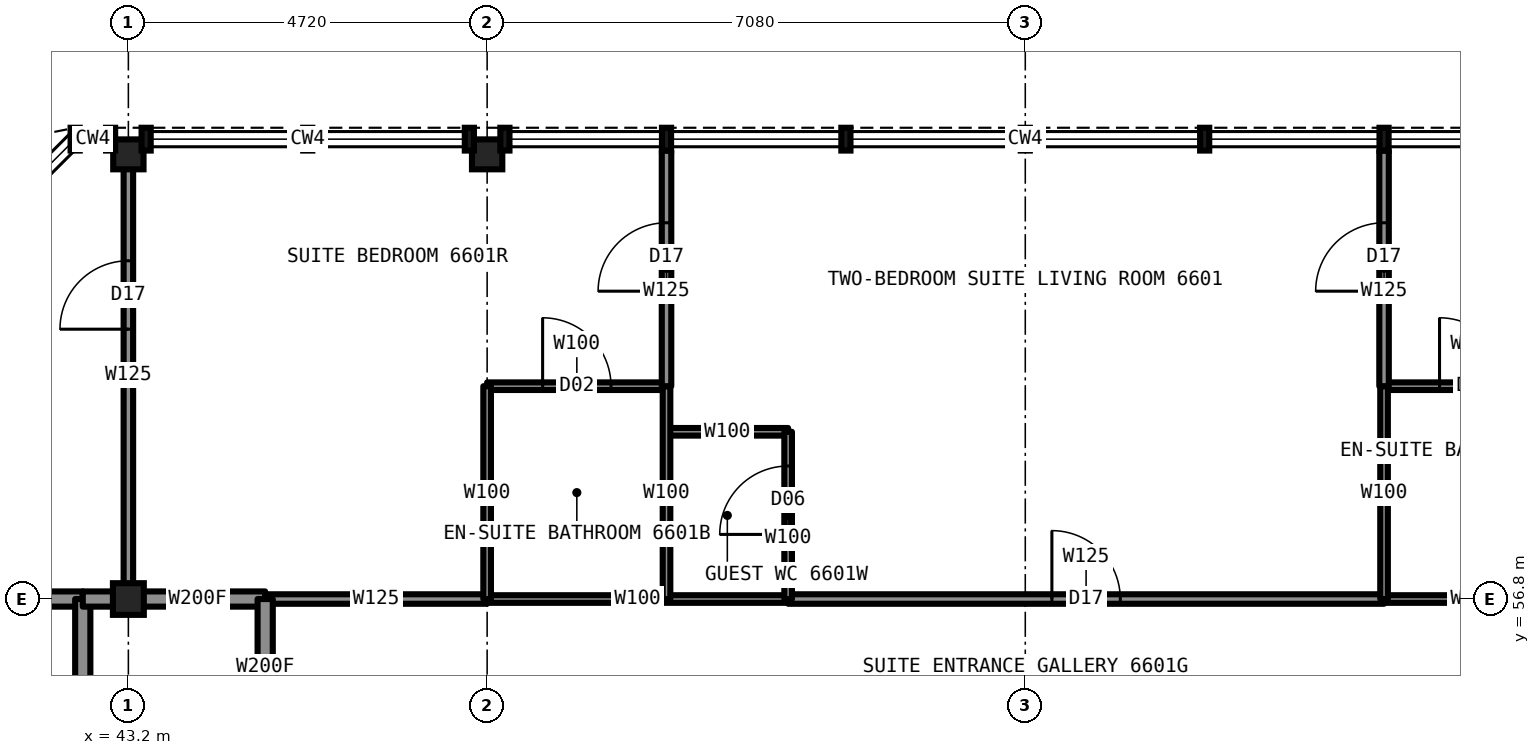
"""IFC4 building model, lengths in metres.
Left out: names, types, materials, properties, quantities, classifications, styles, units other than length and angle.
Written with IfcOpenShell. Run it as: python <this file> out.ifc"""

import sys

from ifc_helpers import new_model, si_unit, direction, frame, frame_2d, origin, origin_2d, place, context, subcontext, project, spatial, rectangle, i_section, extrude, element, fill, save


model = new_model("IFC4")
c1 = context("Model", 3, precision=1e-05, world=origin(), true_north=direction((0.0, 1.0)))
c2 = subcontext(c1, "Body", "Model", "MODEL_VIEW")
j1 = project(units=[si_unit("LENGTHUNIT", "METRE"), si_unit("PLANEANGLEUNIT", "RADIAN")], contexts=[c1])
p1 = place(None, origin())
s1 = spatial("IfcSite", under=j1, at=p1, CompositionType="ELEMENT")
p2 = place(p1, origin())
s2 = spatial("IfcBuilding", under=s1, at=p2, CompositionType="ELEMENT")
p3 = place(p2, frame((0.0, 0.0, 237.2)))
s3 = spatial("IfcBuildingStorey", under=s2, at=p3, CompositionType="ELEMENT", Elevation=237.2)
for number, where, z_axis, x_axis in (
    (1, (43.2, 62.65, 0.0), (0.0, 0.0, 1.0), (1.0, 0.0, 0.0)),
    (2, (47.92, 62.65, 0.0), (0.0, 0.0, 1.0), (1.0, 0.0, 0.0)),
):
    element("IfcColumn", number, at=place(p3, frame(where, z_axis=z_axis, x_axis=x_axis)), inside=s3, PredefinedType="COLUMN", context=c2, shape_type="SweptSolid", body=[
        extrude(i_section(OverallWidth=0.399, OverallDepth=0.394, WebThickness=0.023, FlangeThickness=0.037, at=origin_2d()), origin(), (0.0, 0.0, 1.0), 3.5),
    ])
p4 = place(p3, frame((43.2, 56.8, 0.0), z_axis=(0.0, 0.0, 1.0), x_axis=(1.0, 0.0, 0.0)))
e3 = element("IfcColumn", 3, at=p4, inside=s3, PredefinedType="COLUMN", context=c2, shape_type="SweptSolid", body=[
    extrude(i_section(OverallWidth=0.406, OverallDepth=0.417, WebThickness=0.03, FlangeThickness=0.048, at=origin_2d()), origin(), (0.0, 0.0, 1.0), 3.5),
])
p5 = place(p3, frame((47.92, 56.8, 0.0), z_axis=(0.0, 0.0, 1.0), x_axis=(1.0, 0.0, 0.0)))
e4 = element("IfcWall", 4, at=p5, inside=s3, PredefinedType="PARTITIONING", context=c2, shape_type="SweptSolid", body=[
    extrude(rectangle(XDim=3.96, YDim=0.1, at=frame_2d((1.98, 0.0))), origin(), (0.0, 0.0, 1.0), 3.33),
])
p6 = place(p3, frame((59.72, 56.8, 0.0), z_axis=(0.0, 0.0, 1.0), x_axis=(1.0, 0.0, 0.0)))
e5 = element("IfcWall", 5, at=p6, inside=s3, PredefinedType="PARTITIONING", context=c2, shape_type="SweptSolid", body=[
    extrude(rectangle(XDim=2.36, YDim=0.1, at=frame_2d((1.18, 0.0))), origin(), (0.0, 0.0, 1.0), 3.33),
])
p7 = place(p3, frame((43.22, 56.8, 0.0), z_axis=(0.0, 0.0, 1.0), x_axis=(1.0, 0.0, 0.0)))
e6 = element("IfcWall", 6, at=p7, inside=s3, PredefinedType="PARTITIONING", context=c2, shape_type="SweptSolid", body=[
    extrude(rectangle(XDim=1.78, YDim=0.2, at=frame_2d((0.89, 0.0))), origin(), (0.0, 0.0, 1.0), 3.33),
])
p8 = place(p3, frame((37.3, 56.8, 0.0), z_axis=(0.0, 0.0, 1.0), x_axis=(1.0, 0.0, 0.0)))
e7 = element("IfcWall", 7, at=p8, inside=s3, PredefinedType="PARTITIONING", context=c2, shape_type="SweptSolid", body=[
    extrude(rectangle(XDim=5.3, YDim=0.2, at=frame_2d((2.65, 0.0))), origin(), (0.0, 0.0, 1.0), 2.573),
])
p9 = place(p3, frame((45.0, 56.8, 0.0), z_axis=(0.0, 0.0, 1.0), x_axis=(1.0, 0.0, 0.0)))
e8 = element("IfcWall", 8, at=p9, inside=s3, PredefinedType="PARTITIONING", context=c2, shape_type="SweptSolid", body=[
    extrude(rectangle(XDim=2.92, YDim=0.125, at=frame_2d((1.46, 0.0))), origin(), (0.0, 0.0, 1.0), 3.33),
])
p10 = place(p3, frame((51.88, 56.8, 0.0), z_axis=(0.0, 0.0, 1.0), x_axis=(1.0, 0.0, 0.0)))
e9 = element("IfcWall", 9, at=p10, inside=s3, PredefinedType="PARTITIONING", context=c2, shape_type="SweptSolid", body=[
    extrude(rectangle(XDim=7.84, YDim=0.125, at=frame_2d((3.92, 0.0))), origin(), (0.0, 0.0, 1.0), 3.33),
])
p11 = place(p10, frame((3.47, 0.0, 0.0)))
e10 = element("IfcOpeningElement", 10, at=p11, cuts=e9, PredefinedType="OPENING", context=c2, shape_type="SweptSolid", body=[
    extrude(rectangle(XDim=0.9, YDim=2.2, at=frame_2d((0.45, 1.1))), frame((0.0, 0.073, 0.0), z_axis=(0.0, -1.0, 0.0), x_axis=(1.0, 0.0, 0.0)), (0.0, 0.0, 1.0), 0.145),
])
p12 = place(p3, frame((50.28, 59.0, 0.0), z_axis=(0.0, 0.0, 1.0), x_axis=(1.0, 0.0, 0.0)))
e11 = element("IfcWall", 11, at=p12, inside=s3, PredefinedType="PARTITIONING", context=c2, shape_type="SweptSolid", body=[
    extrude(rectangle(XDim=1.6, YDim=0.1, at=frame_2d((0.8, 0.0))), origin(), (0.0, 0.0, 1.0), 3.33),
])
p13 = place(p3, frame((47.92, 59.6, 0.0), z_axis=(0.0, 0.0, 1.0), x_axis=(1.0, 0.0, 0.0)))
e12 = element("IfcWall", 12, at=p13, inside=s3, PredefinedType="PARTITIONING", context=c2, shape_type="SweptSolid", body=[
    extrude(rectangle(XDim=2.36, YDim=0.1, at=frame_2d((1.18, 0.0))), origin(), (0.0, 0.0, 1.0), 3.33),
])
p14 = place(p13, frame((0.73, 0.0, 0.0)))
e13 = element("IfcOpeningElement", 13, at=p14, cuts=e12, PredefinedType="OPENING", context=c2, shape_type="SweptSolid", body=[
    extrude(rectangle(XDim=0.9, YDim=2.1, at=frame_2d((0.45, 1.05))), frame((0.0, 0.06, 0.0), z_axis=(0.0, -1.0, 0.0), x_axis=(1.0, 0.0, 0.0)), (0.0, 0.0, 1.0), 0.12),
])
p15 = place(p3, frame((59.72, 59.6, 0.0), z_axis=(0.0, 0.0, 1.0), x_axis=(1.0, 0.0, 0.0)))
e14 = element("IfcWall", 14, at=p15, inside=s3, PredefinedType="PARTITIONING", context=c2, shape_type="SweptSolid", body=[
    extrude(rectangle(XDim=2.36, YDim=0.1, at=frame_2d((1.18, 0.0))), origin(), (0.0, 0.0, 1.0), 3.33),
])
p16 = place(p15, frame((0.73, 0.0, 0.0)))
e15 = element("IfcOpeningElement", 15, at=p16, cuts=e14, PredefinedType="OPENING", context=c2, shape_type="SweptSolid", body=[
    extrude(rectangle(XDim=0.9, YDim=2.1, at=frame_2d((0.45, 1.05))), frame((0.0, 0.06, 0.0), z_axis=(0.0, -1.0, 0.0), x_axis=(1.0, 0.0, 0.0)), (0.0, 0.0, 1.0), 0.12),
])
p17 = place(p3, frame((45.0, 55.0, 0.0), z_axis=(0.0, 0.0, 1.0), x_axis=(0.0, 1.0, 0.0)))
e16 = element("IfcWall", 16, at=p17, inside=s3, PredefinedType="PARTITIONING", context=c2, shape_type="SweptSolid", body=[
    extrude(rectangle(XDim=1.8, YDim=0.2, at=frame_2d((0.9, 0.0))), origin(), (0.0, 0.0, 1.0), 3.33),
])
p18 = place(p3, frame((43.2, 56.8, 0.0), z_axis=(0.0, 0.0, 1.0), x_axis=(0.0, 1.0, 0.0)))
e17 = element("IfcWall", 17, at=p18, inside=s3, PredefinedType="PARTITIONING", context=c2, shape_type="SweptSolid", body=[
    extrude(rectangle(XDim=5.9, YDim=0.125, at=frame_2d((2.95, 0.0))), origin(), (0.0, 0.0, 1.0), 2.573),
])
p19 = place(p18, frame((3.55, 0.0, 0.0)))
e18 = element("IfcOpeningElement", 18, at=p19, cuts=e17, PredefinedType="OPENING", context=c2, shape_type="SweptSolid", body=[
    extrude(rectangle(XDim=0.9, YDim=2.2, at=frame_2d((0.45, 1.1))), frame((0.0, 0.073, 0.0), z_axis=(0.0, -1.0, 0.0), x_axis=(1.0, 0.0, 0.0)), (0.0, 0.0, 1.0), 0.145),
])
p20 = place(p3, frame((42.6, 33.2, 0.0), z_axis=(0.0, 0.0, 1.0), x_axis=(0.0, 1.0, 0.0)))
e19 = element("IfcWall", 19, at=p20, inside=s3, PredefinedType="PARTITIONING", context=c2, shape_type="SweptSolid", body=[
    extrude(rectangle(XDim=23.6, YDim=0.2, at=frame_2d((11.8, 0.0))), origin(), (0.0, 0.0, 1.0), 3.33),
])
p21 = place(p20, frame((8.95, 0.0, 0.0)))
e20 = element("IfcOpeningElement", 20, at=p21, cuts=e19, PredefinedType="OPENING", context=c2, shape_type="SweptSolid", body=[
    extrude(rectangle(XDim=1.1, YDim=2.2, at=frame_2d((0.55, 1.1))), frame((0.0, 0.11, 0.0), z_axis=(0.0, -1.0, 0.0), x_axis=(1.0, 0.0, 0.0)), (0.0, 0.0, 1.0), 0.22),
])
p22 = place(p20, frame((0.7, 0.0, 0.0)))
e21 = element("IfcOpeningElement", 21, at=p22, cuts=e19, PredefinedType="OPENING", context=c2, shape_type="SweptSolid", body=[
    extrude(rectangle(XDim=1.0, YDim=2.1, at=frame_2d((0.5, 1.05))), frame((0.0, 0.11, 0.0), z_axis=(0.0, -1.0, 0.0), x_axis=(1.0, 0.0, 0.0)), (0.0, 0.0, 1.0), 0.22),
])
p23 = place(p3, frame((51.88, 56.8, 0.0), z_axis=(0.0, 0.0, 1.0), x_axis=(0.0, 1.0, 0.0)))
e22 = element("IfcWall", 22, at=p23, inside=s3, PredefinedType="PARTITIONING", context=c2, shape_type="SweptSolid", body=[
    extrude(rectangle(XDim=2.2, YDim=0.1, at=frame_2d((1.1, 0.0))), origin(), (0.0, 0.0, 1.0), 3.33),
])
p24 = place(p23, frame((0.85, 0.0, 0.0)))
e23 = element("IfcOpeningElement", 23, at=p24, cuts=e22, PredefinedType="OPENING", context=c2, shape_type="SweptSolid", body=[
    extrude(rectangle(XDim=0.9, YDim=2.1, at=frame_2d((0.45, 1.05))), frame((0.0, 0.06, 0.0), z_axis=(0.0, -1.0, 0.0), x_axis=(1.0, 0.0, 0.0)), (0.0, 0.0, 1.0), 0.12),
])
p25 = place(p3, frame((50.28, 56.8, 0.0), z_axis=(0.0, 0.0, 1.0), x_axis=(0.0, 1.0, 0.0)))
e24 = element("IfcWall", 24, at=p25, inside=s3, PredefinedType="PARTITIONING", context=c2, shape_type="SweptSolid", body=[
    extrude(rectangle(XDim=2.8, YDim=0.1, at=frame_2d((1.4, 0.0))), origin(), (0.0, 0.0, 1.0), 3.33),
])
p26 = place(p3, frame((50.28, 59.6, 0.0), z_axis=(0.0, 0.0, 1.0), x_axis=(0.0, 1.0, 0.0)))
e25 = element("IfcWall", 25, at=p26, inside=s3, PredefinedType="PARTITIONING", context=c2, shape_type="SweptSolid", body=[
    extrude(rectangle(XDim=3.1, YDim=0.125, at=frame_2d((1.55, 0.0))), origin(), (0.0, 0.0, 1.0), 3.33),
])
p27 = place(p26, frame((1.25, 0.0, 0.0)))
e26 = element("IfcOpeningElement", 26, at=p27, cuts=e25, PredefinedType="OPENING", context=c2, shape_type="SweptSolid", body=[
    extrude(rectangle(XDim=0.9, YDim=2.2, at=frame_2d((0.45, 1.1))), frame((0.0, 0.073, 0.0), z_axis=(0.0, -1.0, 0.0), x_axis=(1.0, 0.0, 0.0)), (0.0, 0.0, 1.0), 0.145),
])
p28 = place(p3, frame((47.92, 56.8, 0.0), z_axis=(0.0, 0.0, 1.0), x_axis=(0.0, 1.0, 0.0)))
e27 = element("IfcWall", 27, at=p28, inside=s3, PredefinedType="PARTITIONING", context=c2, shape_type="SweptSolid", body=[
    extrude(rectangle(XDim=2.8, YDim=0.1, at=frame_2d((1.4, 0.0))), origin(), (0.0, 0.0, 1.0), 2.573),
])
p29 = place(p3, frame((59.72, 56.8, 0.0), z_axis=(0.0, 0.0, 1.0), x_axis=(0.0, 1.0, 0.0)))
e28 = element("IfcWall", 28, at=p29, inside=s3, PredefinedType="PARTITIONING", context=c2, shape_type="SweptSolid", body=[
    extrude(rectangle(XDim=2.8, YDim=0.1, at=frame_2d((1.4, 0.0))), origin(), (0.0, 0.0, 1.0), 3.33),
])
p30 = place(p3, frame((59.72, 59.6, 0.0), z_axis=(0.0, 0.0, 1.0), x_axis=(0.0, 1.0, 0.0)))
e29 = element("IfcWall", 29, at=p30, inside=s3, PredefinedType="PARTITIONING", context=c2, shape_type="SweptSolid", body=[
    extrude(rectangle(XDim=3.1, YDim=0.125, at=frame_2d((1.55, 0.0))), origin(), (0.0, 0.0, 1.0), 3.33),
])
p31 = place(p30, frame((1.25, 0.0, 0.0)))
e30 = element("IfcOpeningElement", 30, at=p31, cuts=e29, PredefinedType="OPENING", context=c2, shape_type="SweptSolid", body=[
    extrude(rectangle(XDim=0.9, YDim=2.2, at=frame_2d((0.45, 1.1))), frame((0.0, 0.073, 0.0), z_axis=(0.0, -1.0, 0.0), x_axis=(1.0, 0.0, 0.0)), (0.0, 0.0, 1.0), 0.145),
])
p32 = place(p3, frame((42.6, 56.8, 0.0), z_axis=(0.0, 0.0, 1.0), x_axis=(1.0, 0.0, 0.0)))
e31 = element("IfcWall", 31, at=p32, inside=s3, PredefinedType="PARTITIONING", context=c2, shape_type="SweptSolid", body=[
    extrude(rectangle(XDim=0.62, YDim=0.2, at=frame_2d((0.31, 0.0))), origin(), (0.0, 0.0, 1.0), 2.573),
])
p33 = place(p11, origin())
e32 = element("IfcDoor", 32, at=p33, inside=s3, OperationType="SINGLE_SWING_LEFT", PredefinedType="DOOR", context=c2, shape_type="SweptSolid", body=[
    extrude(rectangle(XDim=0.9, YDim=2.2, at=frame_2d((0.45, 1.1))), frame((0.0, 0.025, 0.0), z_axis=(0.0, -1.0, 0.0), x_axis=(1.0, 0.0, 0.0)), (0.0, 0.0, 1.0), 0.05),
])
fill(e10, e32)
p34 = place(p14, origin())
e33 = element("IfcDoor", 33, at=p34, inside=s3, OperationType="SINGLE_SWING_RIGHT", PredefinedType="DOOR", context=c2, shape_type="SweptSolid", body=[
    extrude(rectangle(XDim=0.9, YDim=2.1, at=frame_2d((0.45, 1.05))), frame((0.0, 0.025, 0.0), z_axis=(0.0, -1.0, 0.0), x_axis=(1.0, 0.0, 0.0)), (0.0, 0.0, 1.0), 0.05),
])
fill(e13, e33)
p35 = place(p16, origin())
e34 = element("IfcDoor", 34, at=p35, inside=s3, OperationType="SINGLE_SWING_RIGHT", PredefinedType="DOOR", context=c2, shape_type="SweptSolid", body=[
    extrude(rectangle(XDim=0.9, YDim=2.1, at=frame_2d((0.45, 1.05))), frame((0.0, 0.025, 0.0), z_axis=(0.0, -1.0, 0.0), x_axis=(1.0, 0.0, 0.0)), (0.0, 0.0, 1.0), 0.05),
])
fill(e15, e34)
p36 = place(p27, origin())
e35 = element("IfcDoor", 35, at=p36, inside=s3, OperationType="SINGLE_SWING_LEFT", PredefinedType="DOOR", context=c2, shape_type="SweptSolid", body=[
    extrude(rectangle(XDim=0.9, YDim=2.2, at=frame_2d((0.45, 1.1))), frame((0.0, 0.025, 0.0), z_axis=(0.0, -1.0, 0.0), x_axis=(1.0, 0.0, 0.0)), (0.0, 0.0, 1.0), 0.05),
])
fill(e26, e35)
p37 = place(p31, origin())
e36 = element("IfcDoor", 36, at=p37, inside=s3, OperationType="SINGLE_SWING_LEFT", PredefinedType="DOOR", context=c2, shape_type="SweptSolid", body=[
    extrude(rectangle(XDim=0.9, YDim=2.2, at=frame_2d((0.45, 1.1))), frame((0.0, 0.025, 0.0), z_axis=(0.0, -1.0, 0.0), x_axis=(1.0, 0.0, 0.0)), (0.0, 0.0, 1.0), 0.05),
])
fill(e30, e36)
p38 = place(p19, origin())
e37 = element("IfcDoor", 37, at=p38, inside=s3, OperationType="SINGLE_SWING_LEFT", PredefinedType="DOOR", context=c2, shape_type="SweptSolid", body=[
    extrude(rectangle(XDim=0.9, YDim=2.2, at=frame_2d((0.45, 1.1))), frame((0.0, 0.025, 0.0), z_axis=(0.0, -1.0, 0.0), x_axis=(1.0, 0.0, 0.0)), (0.0, 0.0, 1.0), 0.05),
])
fill(e18, e37)
p39 = place(p24, origin())
e38 = element("IfcDoor", 38, at=p39, inside=s3, OperationType="SINGLE_SWING_LEFT", PredefinedType="DOOR", context=c2, shape_type="SweptSolid", body=[
    extrude(rectangle(XDim=0.9, YDim=2.1, at=frame_2d((0.45, 1.05))), frame((0.0, 0.025, 0.0), z_axis=(0.0, -1.0, 0.0), x_axis=(1.0, 0.0, 0.0)), (0.0, 0.0, 1.0), 0.05),
])
fill(e23, e38)
save(model, sys.argv[1])
